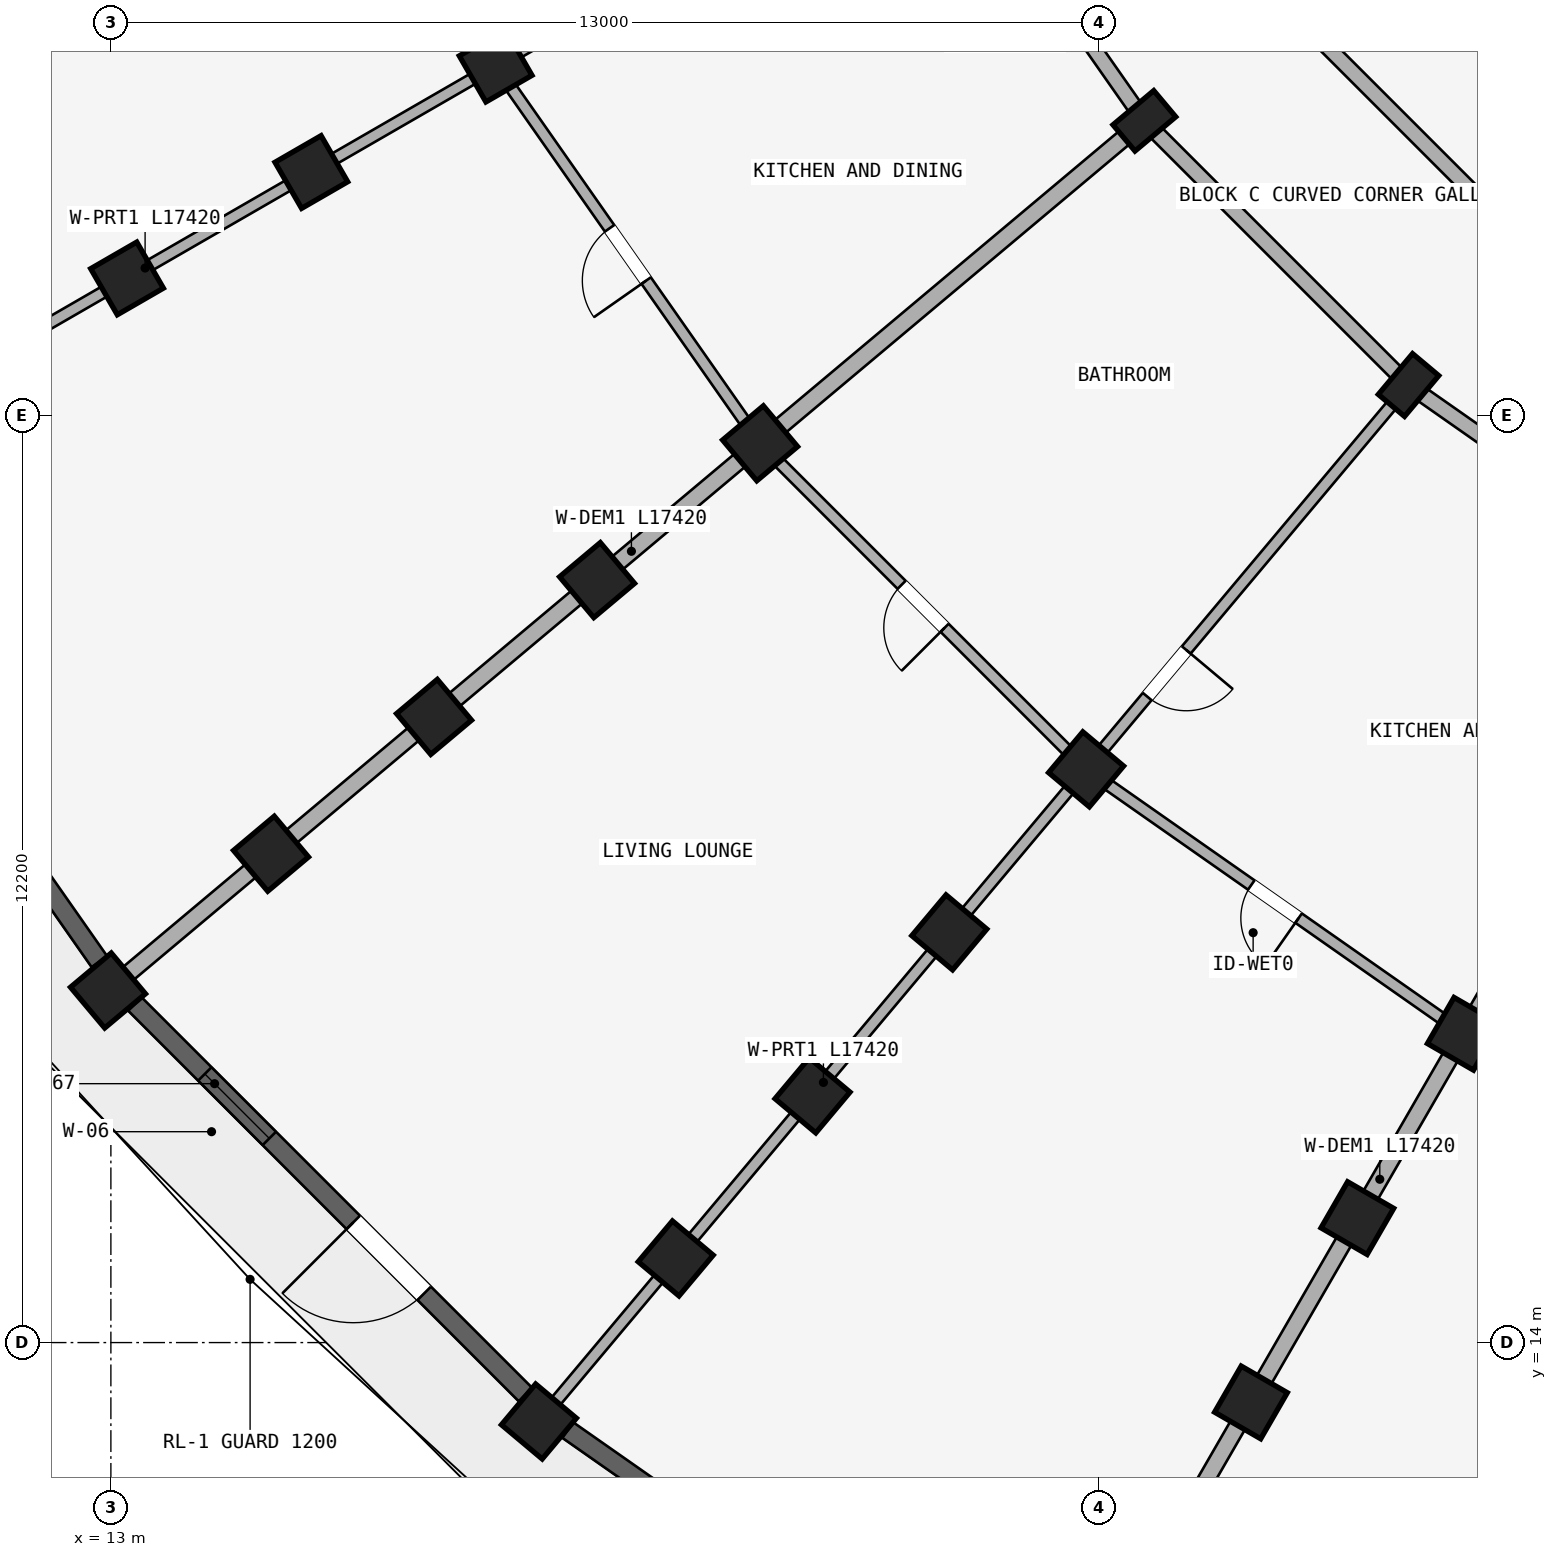
"""IFC4 building model, lengths in metres.
Left out: names, types, materials, properties, quantities, classifications, styles, units other than length and angle.
Written with IfcOpenShell. Run it as: python <this file> out.ifc"""

import sys

from ifc_helpers import new_model, si_unit, direction, frame, frame_2d, origin, origin_2d, place, context, subcontext, project, spatial, rectangle, extrude, element, fill, save


model = new_model("IFC4")
c1 = context("Model", 3, precision=1e-05, world=origin(), true_north=direction((0.0, 1.0)))
c2 = subcontext(c1, "Body", "Model", "MODEL_VIEW")
j1 = project(units=[si_unit("LENGTHUNIT", "METRE"), si_unit("PLANEANGLEUNIT", "RADIAN")], contexts=[c1])
p1 = place(None, origin())
s1 = spatial("IfcSite", under=j1, at=p1, CompositionType="ELEMENT")
p2 = place(p1, origin())
s2 = spatial("IfcBuilding", under=s1, at=p2, CompositionType="ELEMENT")
p3 = place(p2, frame((0.0, 0.0, 18.15)))
s3 = spatial("IfcBuildingStorey", under=s2, at=p3, CompositionType="ELEMENT", Elevation=18.15)
for number, where, z_axis, x_axis in (
    (1, (30.8, 18.062, 0.0), (0.0, 0.0, 1.0), (-0.866, 0.5, 0.0)),
    (2, (29.4, 15.637, 0.0), (0.0, 0.0, 1.0), (-0.866, 0.5, 0.0)),
    (3, (28.0, 13.213, 0.0), (0.0, 0.0, 1.0), (-0.866, 0.5, 0.0)),
):
    element("IfcColumn", number, at=place(p3, frame(where, z_axis=z_axis, x_axis=x_axis)), inside=s3, PredefinedType="COLUMN", context=c2, shape_type="SweptSolid", body=[
        extrude(rectangle(XDim=0.7, YDim=0.7, at=origin_2d()), origin(), (0.0, 0.0, 1.0), 2.93),
    ])
p4 = place(p3, frame((30.073, 26.598, 0.0), z_axis=(0.0, 0.0, 1.0), x_axis=(-0.766044443119, 0.642787609687, 0.0)))
e4 = element("IfcColumn", 4, at=p4, inside=s3, PredefinedType="COLUMN", context=c2, shape_type="SweptSolid", body=[
    extrude(rectangle(XDim=0.45, YDim=0.7, at=origin_2d()), origin(), (0.0, 0.0, 1.0), 2.93),
])
for number, where, z_axis, x_axis in (
    (5, (25.831, 21.542, 0.0), (0.0, 0.0, 1.0), (-0.766, 0.643, 0.0)),
    (6, (24.031, 19.397, 0.0), (0.0, 0.0, 1.0), (-0.766, 0.643, 0.0)),
    (7, (22.231, 17.252, 0.0), (0.0, 0.0, 1.0), (-0.766, 0.643, 0.0)),
    (8, (20.432, 15.107, 0.0), (0.0, 0.0, 1.0), (-0.766, 0.643, 0.0)),
):
    element("IfcColumn", number, at=place(p3, frame(where, z_axis=z_axis, x_axis=x_axis)), inside=s3, PredefinedType="COLUMN", context=c2, shape_type="SweptSolid", body=[
        extrude(rectangle(XDim=0.7, YDim=0.7, at=origin_2d()), origin(), (0.0, 0.0, 1.0), 2.93),
    ])
p5 = place(p3, frame((18.632, 12.962, 0.0), z_axis=(0.0, 0.0, 1.0), x_axis=(-0.766044443119, 0.642787609687, 0.0)))
e9 = element("IfcColumn", 9, at=p5, inside=s3, PredefinedType="COLUMN", context=c2, shape_type="SweptSolid", body=[
    extrude(rectangle(XDim=0.7, YDim=0.7, at=origin_2d()), origin(), (0.0, 0.0, 1.0), 2.97),
])
p6 = place(p3, frame((26.598, 30.073, 0.0), z_axis=(0.0, 0.0, 1.0), x_axis=(-0.642787609687, 0.766044443119, 0.0)))
e10 = element("IfcColumn", 10, at=p6, inside=s3, PredefinedType="COLUMN", context=c2, shape_type="SweptSolid", body=[
    extrude(rectangle(XDim=0.45, YDim=0.7, at=origin_2d()), origin(), (0.0, 0.0, 1.0), 2.93),
])
for number, where, z_axis, x_axis in (
    (11, (21.542, 25.831, 0.0), (0.0, 0.0, 1.0), (-0.643, 0.766, 0.0)),
    (12, (19.397, 24.031, 0.0), (0.0, 0.0, 1.0), (-0.643, 0.766, 0.0)),
    (13, (17.252, 22.231, 0.0), (0.0, 0.0, 1.0), (-0.643, 0.766, 0.0)),
    (14, (15.107, 20.432, 0.0), (0.0, 0.0, 1.0), (-0.643, 0.766, 0.0)),
):
    element("IfcColumn", number, at=place(p3, frame(where, z_axis=z_axis, x_axis=x_axis)), inside=s3, PredefinedType="COLUMN", context=c2, shape_type="SweptSolid", body=[
        extrude(rectangle(XDim=0.7, YDim=0.7, at=origin_2d()), origin(), (0.0, 0.0, 1.0), 2.93),
    ])
p7 = place(p3, frame((12.962, 18.632, 0.0), z_axis=(0.0, 0.0, 1.0), x_axis=(-0.642787609687, 0.766044443119, 0.0)))
e15 = element("IfcColumn", 15, at=p7, inside=s3, PredefinedType="COLUMN", context=c2, shape_type="SweptSolid", body=[
    extrude(rectangle(XDim=0.7, YDim=0.7, at=origin_2d()), origin(), (0.0, 0.0, 1.0), 2.97),
])
for number, where, z_axis, x_axis in (
    (16, (18.062, 30.8, 0.0), (0.0, 0.0, 1.0), (-0.5, 0.866, 0.0)),
    (17, (15.637, 29.4, 0.0), (0.0, 0.0, 1.0), (-0.5, 0.866, 0.0)),
    (18, (13.213, 28.0, 0.0), (0.0, 0.0, 1.0), (-0.5, 0.866, 0.0)),
):
    element("IfcColumn", number, at=place(p3, frame(where, z_axis=z_axis, x_axis=x_axis)), inside=s3, PredefinedType="COLUMN", context=c2, shape_type="SweptSolid", body=[
        extrude(rectangle(XDim=0.7, YDim=0.7, at=origin_2d()), origin(), (0.0, 0.0, 1.0), 2.93),
    ])
p8 = place(p3, frame((34.1, 23.778, 0.0), z_axis=(0.0, 0.0, 1.0), x_axis=(-0.819140911474, 0.573592335331, 0.0)))
e19 = element("IfcWall", 19, at=p8, inside=s3, PredefinedType="STANDARD", context=c2, shape_type="SweptSolid", body=[
    extrude(rectangle(XDim=4.916, YDim=0.2, at=frame_2d((2.458, 0.0))), origin(), (0.0, 0.0, 1.0), 2.372),
])
p9 = place(p8, frame((1.938, 0.0, 0.0)))
e20 = element("IfcOpeningElement", 20, at=p9, cuts=e19, PredefinedType="OPENING", context=c2, shape_type="SweptSolid", body=[
    extrude(rectangle(XDim=1.04, YDim=2.15, at=frame_2d((0.52, 1.075))), frame((0.0, 0.11, 0.0), z_axis=(0.0, -1.0, 0.0), x_axis=(1.0, 0.0, 0.0)), (0.0, 0.0, 1.0), 0.22),
])
p10 = place(p3, frame((31.616, 28.436, 0.0), z_axis=(0.0, 0.0, 1.0), x_axis=(-0.707106781187, 0.707106781187, 0.0)))
e21 = element("IfcWall", 21, at=p10, inside=s3, PredefinedType="STANDARD", context=c2, shape_type="SweptSolid", body=[
    extrude(rectangle(XDim=4.497, YDim=0.2, at=frame_2d((2.249, 0.0))), origin(), (0.0, 0.0, 1.0), 2.372),
])
p11 = place(p3, frame((30.073, 26.598, 0.0), z_axis=(0.0, 0.0, 1.0), x_axis=(-0.707106781187, 0.707106781187, 0.0)))
e22 = element("IfcWall", 22, at=p11, inside=s3, PredefinedType="STANDARD", context=c2, shape_type="SweptSolid", body=[
    extrude(rectangle(XDim=4.916, YDim=0.2, at=frame_2d((2.458, 0.0))), origin(), (0.0, 0.0, 1.0), 2.372),
])
p12 = place(p3, frame((26.598, 30.073, 0.0), z_axis=(0.0, 0.0, 1.0), x_axis=(-0.573592335331, 0.819140911474, 0.0)))
e23 = element("IfcWall", 23, at=p12, inside=s3, PredefinedType="STANDARD", context=c2, shape_type="SweptSolid", body=[
    extrude(rectangle(XDim=4.916, YDim=0.2, at=frame_2d((2.458, 0.0))), origin(), (0.0, 0.0, 1.0), 2.372),
])
p13 = place(p12, frame((1.918, 0.0, 0.0)))
e24 = element("IfcOpeningElement", 24, at=p13, cuts=e23, PredefinedType="OPENING", context=c2, shape_type="SweptSolid", body=[
    extrude(rectangle(XDim=1.08, YDim=2.15, at=frame_2d((0.54, 1.075))), frame((0.0, 0.11, 0.0), z_axis=(0.0, -1.0, 0.0), x_axis=(1.0, 0.0, 0.0)), (0.0, 0.0, 1.0), 0.22),
])
p14 = place(p3, frame((34.05, 23.691, 0.0), z_axis=(0.0, 0.0, 1.0), x_axis=(-0.499997843263, -0.866026648973, 0.0)))
e25 = element("IfcWall", 25, at=p14, inside=s3, PredefinedType="STANDARD", context=c2, shape_type="SweptSolid", body=[
    extrude(rectangle(XDim=17.42, YDim=0.22, at=frame_2d((8.71, 0.0))), origin(), (0.0, 0.0, 1.0), 2.372),
])
p15 = place(p3, frame((30.009, 26.521, 0.0), z_axis=(0.0, 0.0, 1.0), x_axis=(-0.642784757967, -0.766046835987, 0.0)))
e26 = element("IfcWall", 26, at=p15, inside=s3, PredefinedType="PARTITIONING", context=c2, shape_type="SweptSolid", body=[
    extrude(rectangle(XDim=17.42, YDim=0.15, at=frame_2d((8.71, 0.0))), origin(), (0.0, 0.0, 1.0), 2.372),
])
p16 = place(p15, frame((4.45, 0.0, 0.0)))
e27 = element("IfcOpeningElement", 27, at=p16, cuts=e26, PredefinedType="OPENING", context=c2, shape_type="SweptSolid", body=[
    extrude(rectangle(XDim=0.8, YDim=2.1, at=frame_2d((0.4, 1.05))), frame((0.0, 0.085, 0.0), z_axis=(0.0, -1.0, 0.0), x_axis=(1.0, 0.0, 0.0)), (0.0, 0.0, 1.0), 0.17),
])
p17 = place(p3, frame((26.521, 30.009, 0.0), z_axis=(0.0, 0.0, 1.0), x_axis=(-0.766046835987, -0.642784757967, 0.0)))
e28 = element("IfcWall", 28, at=p17, inside=s3, PredefinedType="STANDARD", context=c2, shape_type="SweptSolid", body=[
    extrude(rectangle(XDim=17.42, YDim=0.22, at=frame_2d((8.71, 0.0))), origin(), (0.0, 0.0, 1.0), 2.372),
])
p18 = place(p3, frame((23.691, 34.05, 0.0), z_axis=(0.0, 0.0, 1.0), x_axis=(-0.866026648973, -0.499997843263, 0.0)))
e29 = element("IfcWall", 29, at=p18, inside=s3, PredefinedType="PARTITIONING", context=c2, shape_type="SweptSolid", body=[
    extrude(rectangle(XDim=17.42, YDim=0.15, at=frame_2d((8.71, 0.0))), origin(), (0.0, 0.0, 1.0), 2.372),
])
p19 = place(p18, frame((4.45, 0.0, 0.0)))
e30 = element("IfcOpeningElement", 30, at=p19, cuts=e29, PredefinedType="OPENING", context=c2, shape_type="SweptSolid", body=[
    extrude(rectangle(XDim=0.8, YDim=2.1, at=frame_2d((0.4, 1.05))), frame((0.0, 0.085, 0.0), z_axis=(0.0, -1.0, 0.0), x_axis=(1.0, 0.0, 0.0)), (0.0, 0.0, 1.0), 0.17),
])
p20 = place(p3, frame((36.298, 15.499, 0.0), z_axis=(0.0, 0.0, 1.0), x_axis=(-0.906312656069, 0.42260781991, 0.0)))
e31 = element("IfcWall", 31, at=p20, inside=s3, PredefinedType="PLUMBINGWALL", context=c2, shape_type="SweptSolid", body=[
    extrude(rectangle(XDim=6.066, YDim=0.15, at=frame_2d((3.033, 0.0))), origin(), (0.0, 0.0, 1.0), 2.372),
])
p21 = place(p20, frame((2.613, 0.0, 0.0)))
e32 = element("IfcOpeningElement", 32, at=p21, cuts=e31, PredefinedType="OPENING", context=c2, shape_type="SweptSolid", body=[
    extrude(rectangle(XDim=0.84, YDim=2.1, at=frame_2d((0.42, 1.05))), frame((0.0, 0.085, 0.0), z_axis=(0.0, -1.0, 0.0), x_axis=(1.0, 0.0, 0.0)), (0.0, 0.0, 1.0), 0.17),
])
p22 = place(p3, frame((30.8, 18.062, 0.0), z_axis=(0.0, 0.0, 1.0), x_axis=(-0.81913926159, 0.573594691504, 0.0)))
e33 = element("IfcWall", 33, at=p22, inside=s3, PredefinedType="PLUMBINGWALL", context=c2, shape_type="SweptSolid", body=[
    extrude(rectangle(XDim=6.066, YDim=0.15, at=frame_2d((3.033, 0.0))), origin(), (0.0, 0.0, 1.0), 2.372),
])
p23 = place(p22, frame((2.653, 0.0, 0.0)))
e34 = element("IfcOpeningElement", 34, at=p23, cuts=e33, PredefinedType="OPENING", context=c2, shape_type="SweptSolid", body=[
    extrude(rectangle(XDim=0.76, YDim=2.05, at=frame_2d((0.38, 1.025))), frame((0.0, 0.085, 0.0), z_axis=(0.0, -1.0, 0.0), x_axis=(1.0, 0.0, 0.0)), (0.0, 0.0, 1.0), 0.17),
])
p24 = place(p3, frame((25.831, 21.542, 0.0), z_axis=(0.0, 0.0, 1.0), x_axis=(-0.707106781187, 0.707106781187, 0.0)))
e35 = element("IfcWall", 35, at=p24, inside=s3, PredefinedType="PLUMBINGWALL", context=c2, shape_type="SweptSolid", body=[
    extrude(rectangle(XDim=6.066, YDim=0.15, at=frame_2d((3.033, 0.0))), origin(), (0.0, 0.0, 1.0), 2.372),
])
p25 = place(p24, frame((2.633, 0.0, 0.0)))
e36 = element("IfcOpeningElement", 36, at=p25, cuts=e35, PredefinedType="OPENING", context=c2, shape_type="SweptSolid", body=[
    extrude(rectangle(XDim=0.8, YDim=2.1, at=frame_2d((0.4, 1.05))), frame((0.0, 0.085, 0.0), z_axis=(0.0, -1.0, 0.0), x_axis=(1.0, 0.0, 0.0)), (0.0, 0.0, 1.0), 0.17),
])
p26 = place(p3, frame((21.542, 25.831, 0.0), z_axis=(0.0, 0.0, 1.0), x_axis=(-0.573594691504, 0.81913926159, 0.0)))
e37 = element("IfcWall", 37, at=p26, inside=s3, PredefinedType="PLUMBINGWALL", context=c2, shape_type="SweptSolid", body=[
    extrude(rectangle(XDim=6.066, YDim=0.15, at=frame_2d((3.033, 0.0))), origin(), (0.0, 0.0, 1.0), 2.372),
])
p27 = place(p26, frame((2.613, 0.0, 0.0)))
e38 = element("IfcOpeningElement", 38, at=p27, cuts=e37, PredefinedType="OPENING", context=c2, shape_type="SweptSolid", body=[
    extrude(rectangle(XDim=0.84, YDim=2.1, at=frame_2d((0.42, 1.05))), frame((0.0, 0.085, 0.0), z_axis=(0.0, -1.0, 0.0), x_axis=(1.0, 0.0, 0.0)), (0.0, 0.0, 1.0), 0.17),
])
p28 = place(p3, frame((18.062, 30.8, 0.0), z_axis=(0.0, 0.0, 1.0), x_axis=(-0.42260781991, 0.906312656069, 0.0)))
e39 = element("IfcWall", 39, at=p28, inside=s3, PredefinedType="PLUMBINGWALL", context=c2, shape_type="SweptSolid", body=[
    extrude(rectangle(XDim=6.066, YDim=0.15, at=frame_2d((3.033, 0.0))), origin(), (0.0, 0.0, 1.0), 2.372),
])
p29 = place(p28, frame((2.653, 0.0, 0.0)))
e40 = element("IfcOpeningElement", 40, at=p29, cuts=e39, PredefinedType="OPENING", context=c2, shape_type="SweptSolid", body=[
    extrude(rectangle(XDim=0.76, YDim=2.05, at=frame_2d((0.38, 1.025))), frame((0.0, 0.085, 0.0), z_axis=(0.0, -1.0, 0.0), x_axis=(1.0, 0.0, 0.0)), (0.0, 0.0, 1.0), 0.17),
])
p30 = place(p3, frame((24.964, 8.681, 0.0), z_axis=(0.0, 0.0, 1.0), x_axis=(-0.819159308599, 0.573566061701, 0.0)))
e41 = element("IfcWall", 41, at=p30, inside=s3, PredefinedType="STANDARD", context=c2, shape_type="SweptSolid", body=[
    extrude(rectangle(XDim=7.267, YDim=0.25, at=frame_2d((3.633, 0.0))), origin(), (0.0, 0.0, 1.0), 2.412),
])
p31 = place(p30, frame((2.808, 0.0, 0.462)))
e42 = element("IfcOpeningElement", 42, at=p31, cuts=e41, PredefinedType="OPENING", context=c2, shape_type="SweptSolid", body=[
    extrude(rectangle(XDim=1.65, YDim=1.75, at=frame_2d((0.825, 0.875))), frame((0.0, 0.135, 0.0), z_axis=(0.0, -1.0, 0.0), x_axis=(1.0, 0.0, 0.0)), (0.0, 0.0, 1.0), 0.27),
])
p32 = place(p3, frame((18.454, 13.316, 0.0), z_axis=(0.0, 0.0, 1.0), x_axis=(-0.707106781187, 0.707106781187, 0.0)))
e43 = element("IfcWall", 43, at=p32, inside=s3, PredefinedType="STANDARD", context=c2, shape_type="SweptSolid", body=[
    extrude(rectangle(XDim=7.267, YDim=0.25, at=frame_2d((3.633, 0.0))), origin(), (0.0, 0.0, 1.0), 2.412),
])
p33 = place(p32, frame((4.766, 0.0, 0.562)))
e44 = element("IfcOpeningElement", 44, at=p33, cuts=e43, PredefinedType="OPENING", context=c2, shape_type="SweptSolid", body=[
    extrude(rectangle(XDim=1.2, YDim=1.5, at=frame_2d((0.6, 0.75))), frame((0.0, 0.135, 0.0), z_axis=(0.0, -1.0, 0.0), x_axis=(1.0, 0.0, 0.0)), (0.0, 0.0, 1.0), 0.27),
])
p34 = place(p32, frame((1.883, 0.0, 0.0)))
e45 = element("IfcOpeningElement", 45, at=p34, cuts=e43, PredefinedType="OPENING", context=c2, shape_type="SweptSolid", body=[
    extrude(rectangle(XDim=1.32, YDim=2.15, at=frame_2d((0.66, 1.075))), frame((0.0, 0.135, 0.0), z_axis=(0.0, -1.0, 0.0), x_axis=(1.0, 0.0, 0.0)), (0.0, 0.0, 1.0), 0.27),
])
p35 = place(p3, frame((12.849, 19.011, 0.0), z_axis=(0.0, 0.0, 1.0), x_axis=(-0.573566061701, 0.819159308599, 0.0)))
e46 = element("IfcWall", 46, at=p35, inside=s3, PredefinedType="STANDARD", context=c2, shape_type="SweptSolid", body=[
    extrude(rectangle(XDim=7.267, YDim=0.25, at=frame_2d((3.633, 0.0))), origin(), (0.0, 0.0, 1.0), 2.412),
])
p36 = place(p35, frame((2.583, 0.0, 0.412)))
e47 = element("IfcOpeningElement", 47, at=p36, cuts=e46, PredefinedType="OPENING", context=c2, shape_type="SweptSolid", body=[
    extrude(rectangle(XDim=2.1, YDim=1.8, at=frame_2d((1.05, 0.9))), frame((0.0, 0.135, 0.0), z_axis=(0.0, -1.0, 0.0), x_axis=(1.0, 0.0, 0.0)), (0.0, 0.0, 1.0), 0.27),
])
p37 = place(p33, origin())
e48 = element("IfcWindow", 48, at=p37, inside=s3, PartitioningType="SINGLE_PANEL", PredefinedType="WINDOW", context=c2, shape_type="SweptSolid", body=[
    extrude(rectangle(XDim=1.2, YDim=1.5, at=frame_2d((0.6, 0.75))), frame((0.0, 0.03, 0.0), z_axis=(0.0, -1.0, 0.0), x_axis=(1.0, 0.0, 0.0)), (0.0, 0.0, 1.0), 0.06),
])
fill(e44, e48)
p38 = place(p16, frame((0.8, 0.0, 0.0), z_axis=(0.0, 0.0, 1.0), x_axis=(-1.0, 0.0, 0.0)))
e49 = element("IfcDoor", 49, at=p38, inside=s3, OperationType="SINGLE_SWING_RIGHT", PredefinedType="DOOR", context=c2, shape_type="SweptSolid", body=[
    extrude(rectangle(XDim=0.8, YDim=2.1, at=frame_2d((0.4, 1.05))), frame((0.0, 0.025, 0.0), z_axis=(0.0, -1.0, 0.0), x_axis=(1.0, 0.0, 0.0)), (0.0, 0.0, 1.0), 0.05),
])
fill(e27, e49)
p39 = place(p23, frame((0.76, 0.0, 0.0), z_axis=(0.0, 0.0, 1.0), x_axis=(-1.0, 0.0, 0.0)))
e50 = element("IfcDoor", 50, at=p39, inside=s3, OperationType="SINGLE_SWING_RIGHT", PredefinedType="DOOR", context=c2, shape_type="SweptSolid", body=[
    extrude(rectangle(XDim=0.76, YDim=2.05, at=frame_2d((0.38, 1.025))), frame((0.0, 0.025, 0.0), z_axis=(0.0, -1.0, 0.0), x_axis=(1.0, 0.0, 0.0)), (0.0, 0.0, 1.0), 0.05),
])
fill(e34, e50)
p40 = place(p25, origin())
e51 = element("IfcDoor", 51, at=p40, inside=s3, OperationType="SINGLE_SWING_LEFT", PredefinedType="DOOR", context=c2, shape_type="SweptSolid", body=[
    extrude(rectangle(XDim=0.8, YDim=2.1, at=frame_2d((0.4, 1.05))), frame((0.0, 0.025, 0.0), z_axis=(0.0, -1.0, 0.0), x_axis=(1.0, 0.0, 0.0)), (0.0, 0.0, 1.0), 0.05),
])
fill(e36, e51)
p41 = place(p27, origin())
e52 = element("IfcDoor", 52, at=p41, inside=s3, OperationType="SINGLE_SWING_LEFT", PredefinedType="DOOR", context=c2, shape_type="SweptSolid", body=[
    extrude(rectangle(XDim=0.84, YDim=2.1, at=frame_2d((0.42, 1.05))), frame((0.0, 0.025, 0.0), z_axis=(0.0, -1.0, 0.0), x_axis=(1.0, 0.0, 0.0)), (0.0, 0.0, 1.0), 0.05),
])
fill(e38, e52)
p42 = place(p34, origin())
e53 = element("IfcDoor", 53, at=p42, inside=s3, OperationType="SINGLE_SWING_RIGHT", PredefinedType="DOOR", context=c2, shape_type="SweptSolid", body=[
    extrude(rectangle(XDim=1.32, YDim=2.15, at=frame_2d((0.66, 1.075))), frame((0.0, 0.025, 0.0), z_axis=(0.0, -1.0, 0.0), x_axis=(1.0, 0.0, 0.0)), (0.0, 0.0, 1.0), 0.05),
])
fill(e45, e53)
save(model, sys.argv[1])
